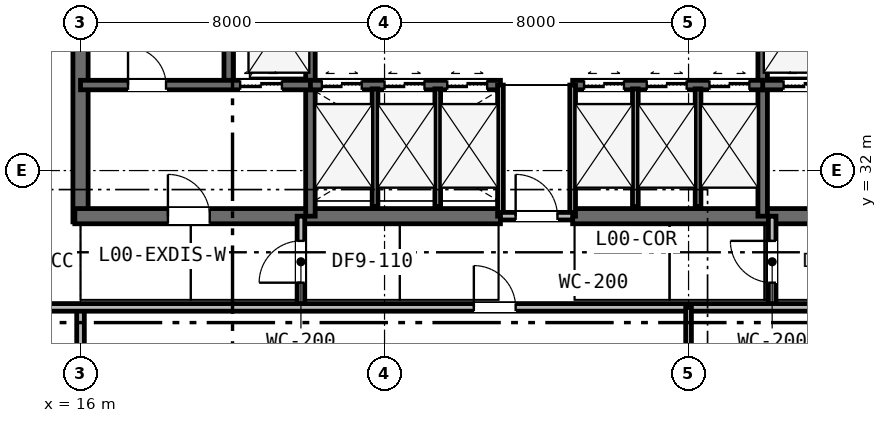
"""IFC4 building model, lengths in metres.
Left out: names, types, materials, properties, quantities, classifications, styles, units other than length and angle.
Written with IfcOpenShell. Run it as: python <this file> out.ifc"""

import sys

from ifc_helpers import new_model, si_unit, direction, frame, frame_2d, origin, place, context, subcontext, project, spatial, rectangle, extrude, element, fill, save


model = new_model("IFC4")
c1 = context("Model", 3, precision=1e-05, world=origin(), true_north=direction((0.0, 1.0)))
c2 = subcontext(c1, "Body", "Model", "MODEL_VIEW")
j1 = project(units=[si_unit("LENGTHUNIT", "METRE"), si_unit("PLANEANGLEUNIT", "RADIAN")], contexts=[c1])
p1 = place(None, origin())
s1 = spatial("IfcSite", under=j1, at=p1, CompositionType="ELEMENT")
p2 = place(p1, origin())
s2 = spatial("IfcBuilding", under=s1, at=p2, CompositionType="ELEMENT")
p3 = place(p2, origin())
s3 = spatial("IfcBuildingStorey", under=s2, at=p3, CompositionType="ELEMENT", Elevation=0.0)
p4 = place(p3, frame((16.0, 30.65, 0.0), z_axis=(0.0, 0.0, 1.0), x_axis=(0.0, 1.0, 0.0)))
e1 = element("IfcWall", 1, at=p4, inside=s3, PredefinedType="SHEAR", context=c2, shape_type="SweptSolid", body=[
    extrude(rectangle(XDim=12.3, YDim=0.4, at=frame_2d((6.15, 0.0))), origin(), (0.0, 0.0, 1.0), 6.0),
])
p5 = place(p3, frame((15.85, 30.8, 0.0), z_axis=(0.0, 0.0, 1.0), x_axis=(1.0, 0.0, 0.0)))
e2 = element("IfcWall", 2, at=p5, inside=s3, PredefinedType="SHEAR", context=c2, shape_type="SweptSolid", body=[
    extrude(rectangle(XDim=11.2, YDim=0.4, at=frame_2d((5.6, 0.0))), origin(), (0.0, 0.0, 1.0), 6.0),
])
p6 = place(p5, frame((2.45, 0.0, 0.0)))
e3 = element("IfcOpeningElement", 3, at=p6, cuts=e2, PredefinedType="OPENING", context=c2, shape_type="SweptSolid", body=[
    extrude(rectangle(XDim=1.1, YDim=2.15, at=frame_2d((0.55, 1.075))), frame((0.0, 0.21, 0.0), z_axis=(0.0, -1.0, 0.0), x_axis=(1.0, 0.0, 0.0)), (0.0, 0.0, 1.0), 0.42),
])
p7 = place(p3, frame((28.95, 30.8, 0.0), z_axis=(0.0, 0.0, 1.0), x_axis=(1.0, 0.0, 0.0)))
e4 = element("IfcWall", 4, at=p7, inside=s3, PredefinedType="SHEAR", context=c2, shape_type="SweptSolid", body=[
    extrude(rectangle(XDim=11.2, YDim=0.4, at=frame_2d((5.6, 0.0))), origin(), (0.0, 0.0, 1.0), 6.0),
])
p8 = place(p7, frame((7.65, 0.0, 0.0)))
e5 = element("IfcOpeningElement", 5, at=p8, cuts=e4, PredefinedType="OPENING", context=c2, shape_type="SweptSolid", body=[
    extrude(rectangle(XDim=1.1, YDim=2.15, at=frame_2d((0.55, 1.075))), frame((0.0, 0.21, 0.0), z_axis=(0.0, -1.0, 0.0), x_axis=(1.0, 0.0, 0.0)), (0.0, 0.0, 1.0), 0.42),
])
p9 = place(p3, frame((19.9, 34.25, 0.0), z_axis=(0.0, 0.0, 1.0), x_axis=(0.0, 1.0, 0.0)))
e6 = element("IfcWall", 6, at=p9, inside=s3, PredefinedType="SHEAR", context=c2, shape_type="SweptSolid", body=[
    extrude(rectangle(XDim=8.65, YDim=0.25, at=frame_2d((4.325, 0.0))), origin(), (0.0, 0.0, 1.0), 6.0),
])
for number, where, z_axis, x_axis in (
    (7, (22.05, 30.8, 0.0), (0.0, 0.0, 1.0), (0.0, 1.0, 0.0)),
    (8, (33.95, 30.8, 0.0), (0.0, 0.0, 1.0), (0.0, 1.0, 0.0)),
):
    element("IfcWall", number, at=place(p3, frame(where, z_axis=z_axis, x_axis=x_axis)), inside=s3, PredefinedType="SHEAR", context=c2, shape_type="SweptSolid", body=[
        extrude(rectangle(XDim=6.45, YDim=0.25, at=frame_2d((3.225, 0.0))), origin(), (0.0, 0.0, 1.0), 6.0),
    ])
p10 = place(p3, frame((16.0, 34.25, 0.0), z_axis=(0.0, 0.0, 1.0), x_axis=(1.0, 0.0, 0.0)))
e9 = element("IfcWall", 9, at=p10, inside=s3, PredefinedType="SHEAR", context=c2, shape_type="SweptSolid", body=[
    extrude(rectangle(XDim=6.05, YDim=0.25, at=frame_2d((3.025, 0.0))), origin(), (0.0, 0.0, 1.0), 6.0),
])
p11 = place(p10, frame((1.25, 0.0, 0.0)))
e10 = element("IfcOpeningElement", 10, at=p11, cuts=e9, PredefinedType="OPENING", context=c2, shape_type="SweptSolid", body=[
    extrude(rectangle(XDim=1.0, YDim=2.15, at=frame_2d((0.5, 1.075))), frame((0.0, 0.135, 0.0), z_axis=(0.0, -1.0, 0.0), x_axis=(1.0, 0.0, 0.0)), (0.0, 0.0, 1.0), 0.27),
])
p12 = place(p10, frame((4.2, 0.0, 0.0)))
e11 = element("IfcOpeningElement", 11, at=p12, cuts=e9, PredefinedType="OPENING", context=c2, shape_type="SweptSolid", body=[
    extrude(rectangle(XDim=1.1, YDim=2.15, at=frame_2d((0.55, 1.075))), frame((0.0, 0.135, 0.0), z_axis=(0.0, -1.0, 0.0), x_axis=(1.0, 0.0, 0.0)), (0.0, 0.0, 1.0), 0.27),
])
p13 = place(p3, frame((33.95, 34.25, 0.0), z_axis=(0.0, 0.0, 1.0), x_axis=(1.0, 0.0, 0.0)))
e12 = element("IfcWall", 12, at=p13, inside=s3, PredefinedType="SHEAR", context=c2, shape_type="SweptSolid", body=[
    extrude(rectangle(XDim=6.05, YDim=0.25, at=frame_2d((3.025, 0.0))), origin(), (0.0, 0.0, 1.0), 6.0),
])
p14 = place(p13, frame((3.7, 0.0, 0.0)))
e13 = element("IfcOpeningElement", 13, at=p14, cuts=e12, PredefinedType="OPENING", context=c2, shape_type="SweptSolid", body=[
    extrude(rectangle(XDim=1.0, YDim=2.15, at=frame_2d((0.5, 1.075))), frame((0.0, 0.135, 0.0), z_axis=(0.0, -1.0, 0.0), x_axis=(1.0, 0.0, 0.0)), (0.0, 0.0, 1.0), 0.27),
])
p15 = place(p13, frame((0.55, 0.0, 0.0)))
e14 = element("IfcOpeningElement", 14, at=p15, cuts=e12, PredefinedType="OPENING", context=c2, shape_type="SweptSolid", body=[
    extrude(rectangle(XDim=1.1, YDim=2.15, at=frame_2d((0.55, 1.075))), frame((0.0, 0.135, 0.0), z_axis=(0.0, -1.0, 0.0), x_axis=(1.0, 0.0, 0.0)), (0.0, 0.0, 1.0), 0.27),
])
p16 = place(p3, frame((22.05, 34.25, 0.0), z_axis=(0.0, 0.0, 1.0), x_axis=(1.0, 0.0, 0.0)))
e15 = element("IfcWall", 15, at=p16, inside=s3, PredefinedType="SHEAR", context=c2, shape_type="SweptSolid", body=[
    extrude(rectangle(XDim=5.0, YDim=0.25, at=frame_2d((2.5, 0.0))), origin(), (0.0, 0.0, 1.0), 6.0),
])
p17 = place(p16, frame((0.3, 0.0, 0.0)))
e16 = element("IfcOpeningElement", 16, at=p17, cuts=e15, PredefinedType="OPENING", context=c2, shape_type="SweptSolid", body=[
    extrude(rectangle(XDim=1.05, YDim=2.15, at=frame_2d((0.525, 1.075))), frame((0.0, 0.135, 0.0), z_axis=(0.0, -1.0, 0.0), x_axis=(1.0, 0.0, 0.0)), (0.0, 0.0, 1.0), 0.27),
])
p18 = place(p16, frame((1.95, 0.0, 0.0)))
e17 = element("IfcOpeningElement", 17, at=p18, cuts=e15, PredefinedType="OPENING", context=c2, shape_type="SweptSolid", body=[
    extrude(rectangle(XDim=1.05, YDim=2.15, at=frame_2d((0.525, 1.075))), frame((0.0, 0.135, 0.0), z_axis=(0.0, -1.0, 0.0), x_axis=(1.0, 0.0, 0.0)), (0.0, 0.0, 1.0), 0.27),
])
p19 = place(p16, frame((3.6, 0.0, 0.0)))
e18 = element("IfcOpeningElement", 18, at=p19, cuts=e15, PredefinedType="OPENING", context=c2, shape_type="SweptSolid", body=[
    extrude(rectangle(XDim=1.05, YDim=2.15, at=frame_2d((0.525, 1.075))), frame((0.0, 0.135, 0.0), z_axis=(0.0, -1.0, 0.0), x_axis=(1.0, 0.0, 0.0)), (0.0, 0.0, 1.0), 0.27),
])
p20 = place(p3, frame((28.95, 34.25, 0.0), z_axis=(0.0, 0.0, 1.0), x_axis=(1.0, 0.0, 0.0)))
e19 = element("IfcWall", 19, at=p20, inside=s3, PredefinedType="SHEAR", context=c2, shape_type="SweptSolid", body=[
    extrude(rectangle(XDim=5.0, YDim=0.25, at=frame_2d((2.5, 0.0))), origin(), (0.0, 0.0, 1.0), 6.0),
])
p21 = place(p20, frame((0.3, 0.0, 0.0)))
e20 = element("IfcOpeningElement", 20, at=p21, cuts=e19, PredefinedType="OPENING", context=c2, shape_type="SweptSolid", body=[
    extrude(rectangle(XDim=1.05, YDim=2.15, at=frame_2d((0.525, 1.075))), frame((0.0, 0.135, 0.0), z_axis=(0.0, -1.0, 0.0), x_axis=(1.0, 0.0, 0.0)), (0.0, 0.0, 1.0), 0.27),
])
p22 = place(p20, frame((1.95, 0.0, 0.0)))
e21 = element("IfcOpeningElement", 21, at=p22, cuts=e19, PredefinedType="OPENING", context=c2, shape_type="SweptSolid", body=[
    extrude(rectangle(XDim=1.05, YDim=2.15, at=frame_2d((0.525, 1.075))), frame((0.0, 0.135, 0.0), z_axis=(0.0, -1.0, 0.0), x_axis=(1.0, 0.0, 0.0)), (0.0, 0.0, 1.0), 0.27),
])
p23 = place(p20, frame((3.6, 0.0, 0.0)))
e22 = element("IfcOpeningElement", 22, at=p23, cuts=e19, PredefinedType="OPENING", context=c2, shape_type="SweptSolid", body=[
    extrude(rectangle(XDim=1.05, YDim=2.15, at=frame_2d((0.525, 1.075))), frame((0.0, 0.135, 0.0), z_axis=(0.0, -1.0, 0.0), x_axis=(1.0, 0.0, 0.0)), (0.0, 0.0, 1.0), 0.27),
])
for number, where, z_axis, x_axis in (
    (23, (27.05, 30.8, 0.0), (0.0, 0.0, 1.0), (0.0, 1.0, 0.0)),
    (24, (28.95, 30.8, 0.0), (0.0, 0.0, 1.0), (0.0, 1.0, 0.0)),
):
    element("IfcWall", number, at=place(p3, frame(where, z_axis=z_axis, x_axis=x_axis)), inside=s3, PredefinedType="PLUMBINGWALL", context=c2, shape_type="SweptSolid", body=[
        extrude(rectangle(XDim=3.45, YDim=0.15, at=frame_2d((1.725, 0.0))), origin(), (0.0, 0.0, 1.0), 5.41),
    ])
p24 = place(p3, frame((27.05, 30.8, 0.0), z_axis=(0.0, 0.0, 1.0), x_axis=(1.0, 0.0, 0.0)))
e25 = element("IfcWall", 25, at=p24, inside=s3, PredefinedType="PARTITIONING", context=c2, shape_type="SweptSolid", body=[
    extrude(rectangle(XDim=1.9, YDim=0.2, at=frame_2d((0.95, 0.0))), origin(), (0.0, 0.0, 1.0), 5.41),
])
p25 = place(p24, frame((0.4, 0.0, 0.0)))
e26 = element("IfcOpeningElement", 26, at=p25, cuts=e25, PredefinedType="OPENING", context=c2, shape_type="SweptSolid", body=[
    extrude(rectangle(XDim=1.1, YDim=2.15, at=frame_2d((0.55, 1.075))), frame((0.0, 0.11, 0.0), z_axis=(0.0, -1.0, 0.0), x_axis=(1.0, 0.0, 0.0)), (0.0, 0.0, 1.0), 0.22),
])
for number, where, z_axis, x_axis in (
    (27, (23.75, 31.05, 0.0), (0.0, 0.0, 1.0), (0.0, 1.0, 0.0)),
    (28, (25.4, 31.05, 0.0), (0.0, 0.0, 1.0), (0.0, 1.0, 0.0)),
    (29, (30.6, 31.05, 0.0), (0.0, 0.0, 1.0), (0.0, 1.0, 0.0)),
    (30, (32.25, 31.05, 0.0), (0.0, 0.0, 1.0), (0.0, 1.0, 0.0)),
):
    element("IfcWall", number, at=place(p3, frame(where, z_axis=z_axis, x_axis=x_axis)), inside=s3, PredefinedType="PLUMBINGWALL", context=c2, shape_type="SweptSolid", body=[
        extrude(rectangle(XDim=3.1, YDim=0.15, at=frame_2d((1.55, 0.0))), origin(), (0.0, 0.0, 1.0), 5.67),
    ])
p26 = place(p3, frame((21.8, 28.4, 0.0), z_axis=(0.0, 0.0, 1.0), x_axis=(0.0, 1.0, 0.0)))
e31 = element("IfcWall", 31, at=p26, inside=s3, PredefinedType="PARTITIONING", context=c2, shape_type="SweptSolid", body=[
    extrude(rectangle(XDim=2.4, YDim=0.2, at=frame_2d((1.2, 0.0))), origin(), (0.0, 0.0, 1.0), 5.26),
])
p27 = place(p26, frame((0.65, 0.0, 0.0)))
e32 = element("IfcOpeningElement", 32, at=p27, cuts=e31, PredefinedType="OPENING", context=c2, shape_type="SweptSolid", body=[
    extrude(rectangle(XDim=1.1, YDim=2.15, at=frame_2d((0.55, 1.075))), frame((0.0, 0.11, 0.0), z_axis=(0.0, -1.0, 0.0), x_axis=(1.0, 0.0, 0.0)), (0.0, 0.0, 1.0), 0.22),
])
p28 = place(p3, frame((34.2, 28.4, 0.0), z_axis=(0.0, 0.0, 1.0), x_axis=(0.0, 1.0, 0.0)))
e33 = element("IfcWall", 33, at=p28, inside=s3, PredefinedType="PARTITIONING", context=c2, shape_type="SweptSolid", body=[
    extrude(rectangle(XDim=2.4, YDim=0.2, at=frame_2d((1.2, 0.0))), origin(), (0.0, 0.0, 1.0), 5.26),
])
p29 = place(p28, frame((0.65, 0.0, 0.0)))
e34 = element("IfcOpeningElement", 34, at=p29, cuts=e33, PredefinedType="OPENING", context=c2, shape_type="SweptSolid", body=[
    extrude(rectangle(XDim=1.1, YDim=2.15, at=frame_2d((0.55, 1.075))), frame((0.0, 0.11, 0.0), z_axis=(0.0, -1.0, 0.0), x_axis=(1.0, 0.0, 0.0)), (0.0, 0.0, 1.0), 0.22),
])
p30 = place(p3, frame((16.0, 24.0, 0.0), z_axis=(0.0, 0.0, 1.0), x_axis=(0.0, 1.0, 0.0)))
e35 = element("IfcWall", 35, at=p30, inside=s3, PredefinedType="PARTITIONING", context=c2, shape_type="SweptSolid", body=[
    extrude(rectangle(XDim=4.4, YDim=0.2, at=frame_2d((2.2, 0.0))), origin(), (0.0, 0.0, 1.0), 5.02),
])
p31 = place(p3, frame((3.1, 28.4, 0.0), z_axis=(0.0, 0.0, 1.0), x_axis=(1.0, 0.0, 0.0)))
e36 = element("IfcWall", 36, at=p31, inside=s3, PredefinedType="PARTITIONING", context=c2, shape_type="SweptSolid", body=[
    extrude(rectangle(XDim=52.8, YDim=0.2, at=frame_2d((26.4, 0.0))), origin(), (0.0, 0.0, 1.0), 5.02),
])
p32 = place(p31, frame((8.7, 0.0, 0.0)))
e37 = element("IfcOpeningElement", 37, at=p32, cuts=e36, PredefinedType="OPENING", context=c2, shape_type="SweptSolid", body=[
    extrude(rectangle(XDim=1.0, YDim=2.15, at=frame_2d((0.5, 1.075))), frame((0.0, 0.11, 0.0), z_axis=(0.0, -1.0, 0.0), x_axis=(1.0, 0.0, 0.0)), (0.0, 0.0, 1.0), 0.22),
])
p33 = place(p31, frame((23.25, 0.0, 0.0)))
e38 = element("IfcOpeningElement", 38, at=p33, cuts=e36, PredefinedType="OPENING", context=c2, shape_type="SweptSolid", body=[
    extrude(rectangle(XDim=1.1, YDim=2.15, at=frame_2d((0.55, 1.075))), frame((0.0, 0.11, 0.0), z_axis=(0.0, -1.0, 0.0), x_axis=(1.0, 0.0, 0.0)), (0.0, 0.0, 1.0), 0.22),
])
p34 = place(p31, frame((39.702, 0.0, 0.0)))
e39 = element("IfcOpeningElement", 39, at=p34, cuts=e36, PredefinedType="OPENING", context=c2, shape_type="SweptSolid", body=[
    extrude(rectangle(XDim=1.1, YDim=2.15, at=frame_2d((0.55, 1.075))), frame((0.0, 0.11, 0.0), z_axis=(0.0, -1.0, 0.0), x_axis=(1.0, 0.0, 0.0)), (0.0, 0.0, 1.0), 0.22),
])
p35 = place(p31, frame((3.34, 0.0, 0.0)))
e40 = element("IfcOpeningElement", 40, at=p35, cuts=e36, PredefinedType="OPENING", context=c2, shape_type="SweptSolid", body=[
    extrude(rectangle(XDim=1.1, YDim=2.15, at=frame_2d((0.55, 1.075))), frame((0.0, 0.11, 0.0), z_axis=(0.0, -1.0, 0.0), x_axis=(1.0, 0.0, 0.0)), (0.0, 0.0, 1.0), 0.22),
])
p36 = place(p3, frame((32.0, 24.1, 0.0), z_axis=(0.0, 0.0, 1.0), x_axis=(0.0, 1.0, 0.0)))
e41 = element("IfcWall", 41, at=p36, inside=s3, PredefinedType="PARTITIONING", context=c2, shape_type="SweptSolid", body=[
    extrude(rectangle(XDim=4.3, YDim=0.15, at=frame_2d((2.15, 0.0))), origin(), (0.0, 0.0, 1.0), 5.21),
])
p37 = place(p25, origin())
e42 = element("IfcDoor", 42, at=p37, inside=s3, OperationType="SINGLE_SWING_LEFT", PredefinedType="DOOR", context=c2, shape_type="SweptSolid", body=[
    extrude(rectangle(XDim=1.1, YDim=2.15, at=frame_2d((0.55, 1.075))), frame((0.0, 0.025, 0.0), z_axis=(0.0, -1.0, 0.0), x_axis=(1.0, 0.0, 0.0)), (0.0, 0.0, 1.0), 0.05),
])
fill(e26, e42)
p38 = place(p11, origin())
e43 = element("IfcDoor", 43, at=p38, inside=s3, OperationType="SINGLE_SWING_LEFT", PredefinedType="DOOR", context=c2, shape_type="SweptSolid", body=[
    extrude(rectangle(XDim=1.0, YDim=2.15, at=frame_2d((0.5, 1.075))), frame((0.0, 0.025, 0.0), z_axis=(0.0, -1.0, 0.0), x_axis=(1.0, 0.0, 0.0)), (0.0, 0.0, 1.0), 0.05),
])
fill(e10, e43)
p39 = place(p6, origin())
e44 = element("IfcDoor", 44, at=p39, inside=s3, OperationType="SINGLE_SWING_LEFT", PredefinedType="DOOR", context=c2, shape_type="SweptSolid", body=[
    extrude(rectangle(XDim=1.1, YDim=2.15, at=frame_2d((0.55, 1.075))), frame((0.0, 0.025, 0.0), z_axis=(0.0, -1.0, 0.0), x_axis=(1.0, 0.0, 0.0)), (0.0, 0.0, 1.0), 0.05),
])
fill(e3, e44)
p40 = place(p27, origin())
e45 = element("IfcDoor", 45, at=p40, inside=s3, OperationType="SINGLE_SWING_LEFT", PredefinedType="DOOR", context=c2, shape_type="SweptSolid", body=[
    extrude(rectangle(XDim=1.1, YDim=2.15, at=frame_2d((0.55, 1.075))), frame((0.0, 0.025, 0.0), z_axis=(0.0, -1.0, 0.0), x_axis=(1.0, 0.0, 0.0)), (0.0, 0.0, 1.0), 0.05),
])
fill(e32, e45)
p41 = place(p29, origin())
e46 = element("IfcDoor", 46, at=p41, inside=s3, OperationType="SINGLE_SWING_RIGHT", PredefinedType="DOOR", context=c2, shape_type="SweptSolid", body=[
    extrude(rectangle(XDim=1.1, YDim=2.15, at=frame_2d((0.55, 1.075))), frame((0.0, 0.025, 0.0), z_axis=(0.0, -1.0, 0.0), x_axis=(1.0, 0.0, 0.0)), (0.0, 0.0, 1.0), 0.05),
])
fill(e34, e46)
p42 = place(p33, origin())
e47 = element("IfcDoor", 47, at=p42, inside=s3, OperationType="SINGLE_SWING_LEFT", PredefinedType="DOOR", context=c2, shape_type="SweptSolid", body=[
    extrude(rectangle(XDim=1.1, YDim=2.15, at=frame_2d((0.55, 1.075))), frame((0.0, 0.025, 0.0), z_axis=(0.0, -1.0, 0.0), x_axis=(1.0, 0.0, 0.0)), (0.0, 0.0, 1.0), 0.05),
])
fill(e38, e47)
p43 = place(p12, origin())
e48 = element("IfcDoor", 48, at=p43, inside=s3, OperationType="DOUBLE_DOOR_SLIDING", PredefinedType="DOOR", context=c2, shape_type="SweptSolid", body=[
    extrude(rectangle(XDim=1.1, YDim=2.15, at=frame_2d((0.55, 1.075))), frame((0.0, 0.025, 0.0), z_axis=(0.0, -1.0, 0.0), x_axis=(1.0, 0.0, 0.0)), (0.0, 0.0, 1.0), 0.05),
])
fill(e11, e48)
p44 = place(p15, origin())
e49 = element("IfcDoor", 49, at=p44, inside=s3, OperationType="DOUBLE_DOOR_SLIDING", PredefinedType="DOOR", context=c2, shape_type="SweptSolid", body=[
    extrude(rectangle(XDim=1.1, YDim=2.15, at=frame_2d((0.55, 1.075))), frame((0.0, 0.025, 0.0), z_axis=(0.0, -1.0, 0.0), x_axis=(1.0, 0.0, 0.0)), (0.0, 0.0, 1.0), 0.05),
])
fill(e14, e49)
p45 = place(p17, origin())
e50 = element("IfcDoor", 50, at=p45, inside=s3, OperationType="DOUBLE_DOOR_SLIDING", PredefinedType="DOOR", context=c2, shape_type="SweptSolid", body=[
    extrude(rectangle(XDim=1.05, YDim=2.15, at=frame_2d((0.525, 1.075))), frame((0.0, 0.025, 0.0), z_axis=(0.0, -1.0, 0.0), x_axis=(1.0, 0.0, 0.0)), (0.0, 0.0, 1.0), 0.05),
])
fill(e16, e50)
p46 = place(p18, origin())
e51 = element("IfcDoor", 51, at=p46, inside=s3, OperationType="DOUBLE_DOOR_SLIDING", PredefinedType="DOOR", context=c2, shape_type="SweptSolid", body=[
    extrude(rectangle(XDim=1.05, YDim=2.15, at=frame_2d((0.525, 1.075))), frame((0.0, 0.025, 0.0), z_axis=(0.0, -1.0, 0.0), x_axis=(1.0, 0.0, 0.0)), (0.0, 0.0, 1.0), 0.05),
])
fill(e17, e51)
p47 = place(p19, origin())
e52 = element("IfcDoor", 52, at=p47, inside=s3, OperationType="DOUBLE_DOOR_SLIDING", PredefinedType="DOOR", context=c2, shape_type="SweptSolid", body=[
    extrude(rectangle(XDim=1.05, YDim=2.15, at=frame_2d((0.525, 1.075))), frame((0.0, 0.025, 0.0), z_axis=(0.0, -1.0, 0.0), x_axis=(1.0, 0.0, 0.0)), (0.0, 0.0, 1.0), 0.05),
])
fill(e18, e52)
p48 = place(p21, origin())
e53 = element("IfcDoor", 53, at=p48, inside=s3, OperationType="DOUBLE_DOOR_SLIDING", PredefinedType="DOOR", context=c2, shape_type="SweptSolid", body=[
    extrude(rectangle(XDim=1.05, YDim=2.15, at=frame_2d((0.525, 1.075))), frame((0.0, 0.025, 0.0), z_axis=(0.0, -1.0, 0.0), x_axis=(1.0, 0.0, 0.0)), (0.0, 0.0, 1.0), 0.05),
])
fill(e20, e53)
p49 = place(p22, origin())
e54 = element("IfcDoor", 54, at=p49, inside=s3, OperationType="DOUBLE_DOOR_SLIDING", PredefinedType="DOOR", context=c2, shape_type="SweptSolid", body=[
    extrude(rectangle(XDim=1.05, YDim=2.15, at=frame_2d((0.525, 1.075))), frame((0.0, 0.025, 0.0), z_axis=(0.0, -1.0, 0.0), x_axis=(1.0, 0.0, 0.0)), (0.0, 0.0, 1.0), 0.05),
])
fill(e21, e54)
p50 = place(p23, origin())
e55 = element("IfcDoor", 55, at=p50, inside=s3, OperationType="DOUBLE_DOOR_SLIDING", PredefinedType="DOOR", context=c2, shape_type="SweptSolid", body=[
    extrude(rectangle(XDim=1.05, YDim=2.15, at=frame_2d((0.525, 1.075))), frame((0.0, 0.025, 0.0), z_axis=(0.0, -1.0, 0.0), x_axis=(1.0, 0.0, 0.0)), (0.0, 0.0, 1.0), 0.05),
])
fill(e22, e55)
save(model, sys.argv[1])
